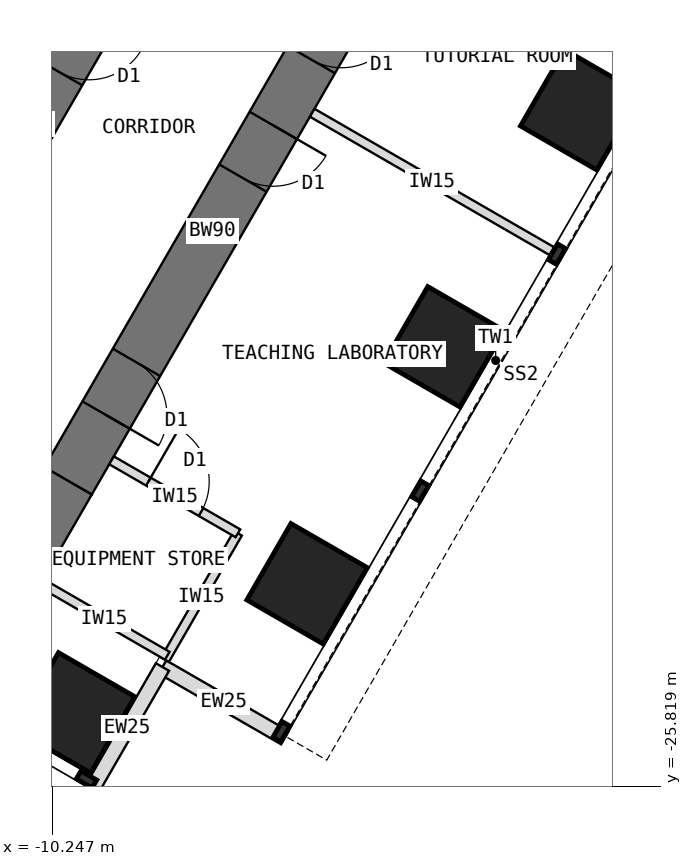
"""IFC4 building model, lengths in metres.
Left out: names, types, materials, properties, quantities, classifications, styles, units other than length and angle.
Written with IfcOpenShell. Run it as: python <this file> out.ifc"""

import sys

from ifc_helpers import new_model, si_unit, direction, frame, frame_2d, origin, origin_2d, place, context, subcontext, project, spatial, rectangle, extrude, element, fill, save


model = new_model("IFC4")
c1 = context("Model", 3, precision=1e-05, world=origin(), true_north=direction((0.0, 1.0)))
c2 = subcontext(c1, "Body", "Model", "MODEL_VIEW")
j1 = project(units=[si_unit("LENGTHUNIT", "METRE"), si_unit("PLANEANGLEUNIT", "RADIAN")], contexts=[c1])
p1 = place(None, origin())
s1 = spatial("IfcSite", under=j1, at=p1, CompositionType="ELEMENT")
p2 = place(p1, origin())
s2 = spatial("IfcBuilding", under=s1, at=p2, CompositionType="ELEMENT")
p3 = place(p2, frame((0.0, 0.0, 52.5)))
s3 = spatial("IfcBuildingStorey", under=s2, at=p3, CompositionType="ELEMENT", Elevation=52.5)
p4 = place(p3, frame((-5.234, -12.566, 0.0), z_axis=(0.0, 0.0, 1.0), x_axis=(-0.499997557548, -0.86602681393, 0.0)))
e1 = element("IfcWall", 1, at=p4, inside=s3, PredefinedType="SHEAR", context=c2, shape_type="SweptSolid", body=[
    extrude(rectangle(XDim=9.5, YDim=0.9, at=frame_2d((4.75, 0.0))), origin(), (0.0, 0.0, 1.0), 4.0),
])
p5 = place(p4, frame((0.5, 0.0, 0.0)))
e2 = element("IfcOpeningElement", 2, at=p5, cuts=e1, PredefinedType="OPENING", context=c2, shape_type="SweptSolid", body=[
    extrude(rectangle(XDim=1.0, YDim=2.1, at=frame_2d((0.5, 1.05))), frame((0.0, 0.46, 0.0), z_axis=(0.0, -1.0, 0.0), x_axis=(1.0, 0.0, 0.0)), (0.0, 0.0, 1.0), 0.92),
])
p6 = place(p4, frame((2.75, 0.0, 0.0)))
e3 = element("IfcOpeningElement", 3, at=p6, cuts=e1, PredefinedType="OPENING", context=c2, shape_type="SweptSolid", body=[
    extrude(rectangle(XDim=1.0, YDim=2.1, at=frame_2d((0.5, 1.05))), frame((0.0, 0.46, 0.0), z_axis=(0.0, -1.0, 0.0), x_axis=(1.0, 0.0, 0.0)), (0.0, 0.0, 1.0), 0.92),
])
p7 = place(p4, frame((7.25, 0.0, 0.0)))
e4 = element("IfcOpeningElement", 4, at=p7, cuts=e1, PredefinedType="OPENING", context=c2, shape_type="SweptSolid", body=[
    extrude(rectangle(XDim=1.0, YDim=2.1, at=frame_2d((0.5, 1.05))), frame((0.0, 0.46, 0.0), z_axis=(0.0, -1.0, 0.0), x_axis=(1.0, 0.0, 0.0)), (0.0, 0.0, 1.0), 0.92),
])
p8 = place(p3, frame((-9.984, -20.794, 0.0), z_axis=(0.0, 0.0, 1.0), x_axis=(-0.500042316284, -0.866000971088, 0.0)))
e5 = element("IfcWall", 5, at=p8, inside=s3, PredefinedType="SHEAR", context=c2, shape_type="SweptSolid", body=[
    extrude(rectangle(XDim=3.7, YDim=0.9, at=frame_2d((1.85, 0.0))), origin(), (0.0, 0.0, 1.0), 4.0),
])
p9 = place(p3, frame((-8.266, -10.816, 0.0), z_axis=(0.0, 0.0, 1.0), x_axis=(-0.499997557548, -0.86602681393, 0.0)))
e6 = element("IfcWall", 6, at=p9, inside=s3, PredefinedType="SHEAR", context=c2, shape_type="SweptSolid", body=[
    extrude(rectangle(XDim=9.5, YDim=0.9, at=frame_2d((4.75, 0.0))), origin(), (0.0, 0.0, 1.0), 4.0),
])
p10 = place(p9, frame((0.5, 0.0, 0.0)))
e7 = element("IfcOpeningElement", 7, at=p10, cuts=e6, PredefinedType="OPENING", context=c2, shape_type="SweptSolid", body=[
    extrude(rectangle(XDim=1.0, YDim=2.1, at=frame_2d((0.5, 1.05))), frame((0.0, 0.46, 0.0), z_axis=(0.0, -1.0, 0.0), x_axis=(1.0, 0.0, 0.0)), (0.0, 0.0, 1.0), 0.92),
])
p11 = place(p9, frame((2.75, 0.0, 0.0)))
e8 = element("IfcOpeningElement", 8, at=p11, cuts=e6, PredefinedType="OPENING", context=c2, shape_type="SweptSolid", body=[
    extrude(rectangle(XDim=1.0, YDim=2.1, at=frame_2d((0.5, 1.05))), frame((0.0, 0.46, 0.0), z_axis=(0.0, -1.0, 0.0), x_axis=(1.0, 0.0, 0.0)), (0.0, 0.0, 1.0), 0.92),
])
p12 = place(p9, frame((7.25, 0.0, 0.0)))
e9 = element("IfcOpeningElement", 9, at=p12, cuts=e6, PredefinedType="OPENING", context=c2, shape_type="SweptSolid", body=[
    extrude(rectangle(XDim=1.0, YDim=2.1, at=frame_2d((0.5, 1.05))), frame((0.0, 0.46, 0.0), z_axis=(0.0, -1.0, 0.0), x_axis=(1.0, 0.0, 0.0)), (0.0, 0.0, 1.0), 0.92),
])
for number, where, z_axis, x_axis in (
    (10, (-1.554, -14.691, 0.0), (0.0, 0.0, 1.0), (0.5, 0.866, 0.0)),
    (11, (-3.804, -18.588, 0.0), (0.0, 0.0, 1.0), (0.5, 0.866, 0.0)),
    (12, (-6.054, -22.486, 0.0), (0.0, 0.0, 1.0), (0.5, 0.866, 0.0)),
    (13, (-9.877, -24.608, 0.0), (0.0, 0.0, 1.0), (0.5, 0.866, 0.0)),
):
    element("IfcColumn", number, at=place(p3, frame(where, z_axis=z_axis, x_axis=x_axis)), inside=s3, PredefinedType="COLUMN", context=c2, shape_type="SweptSolid", body=[
        extrude(rectangle(XDim=1.45, YDim=1.45, at=origin_2d()), origin(), (0.0, 0.0, 1.0), 4.0),
    ])
for number, where, z_axis, x_axis in (
    (14, (-6.419, -25.017, 0.0), (0.0, 0.0, 1.0), (-0.866, 0.5, 0.0)),
    (15, (-8.432, -23.855, 0.0), (0.0, 0.0, 1.0), (-0.5, -0.866, 0.0)),
):
    element("IfcWall", number, at=place(p3, frame(where, z_axis=z_axis, x_axis=x_axis)), inside=s3, PredefinedType="STANDARD", context=c2, shape_type="SweptSolid", body=[
        extrude(rectangle(XDim=2.325, YDim=0.25, at=frame_2d((1.163, 0.0))), origin(), (0.0, 0.0, 1.0), 3.8),
    ])
p13 = place(p3, frame((-5.97, -14.74, 0.0), z_axis=(0.0, 0.0, 1.0), x_axis=(0.866035472144, -0.499982560684, 0.0)))
e16 = element("IfcWall", 16, at=p13, inside=s3, PredefinedType="PARTITIONING", context=c2, shape_type="SweptSolid", body=[
    extrude(rectangle(XDim=4.55, YDim=0.15, at=frame_2d((2.275, 0.0))), origin(), (0.0, 0.0, 1.0), 3.8),
])
p14 = place(p3, frame((-7.191, -21.656, 0.0), z_axis=(0.0, 0.0, 1.0), x_axis=(-0.500077600433, -0.865980596518, 0.0)))
e17 = element("IfcWall", 17, at=p14, inside=s3, PredefinedType="PARTITIONING", context=c2, shape_type="SweptSolid", body=[
    extrude(rectangle(XDim=2.4, YDim=0.15, at=frame_2d((1.2, 0.0))), origin(), (0.0, 0.0, 1.0), 3.8),
])
p15 = place(p3, frame((-9.27, -20.456, 0.0), z_axis=(0.0, 0.0, 1.0), x_axis=(0.866006032174, -0.500033551112, 0.0)))
e18 = element("IfcWall", 18, at=p15, inside=s3, PredefinedType="PARTITIONING", context=c2, shape_type="SweptSolid", body=[
    extrude(rectangle(XDim=2.4, YDim=0.15, at=frame_2d((1.2, 0.0))), origin(), (0.0, 0.0, 1.0), 3.8),
])
p16 = place(p15, frame((0.7, 0.0, 0.0)))
e19 = element("IfcOpeningElement", 19, at=p16, cuts=e18, PredefinedType="OPENING", context=c2, shape_type="SweptSolid", body=[
    extrude(rectangle(XDim=1.0, YDim=2.1, at=frame_2d((0.5, 1.05))), frame((0.0, 0.085, 0.0), z_axis=(0.0, -1.0, 0.0), x_axis=(1.0, 0.0, 0.0)), (0.0, 0.0, 1.0), 0.17),
])
p17 = place(p3, frame((-10.432, -22.469, 0.0), z_axis=(0.0, 0.0, 1.0), x_axis=(0.866024647952, -0.500001309137, 0.0)))
e20 = element("IfcWall", 20, at=p17, inside=s3, PredefinedType="PARTITIONING", context=c2, shape_type="SweptSolid", body=[
    extrude(rectangle(XDim=2.4, YDim=0.15, at=frame_2d((1.2, 0.0))), origin(), (0.0, 0.0, 1.0), 3.8),
])
p18 = place(p16, origin())
e21 = element("IfcDoor", 21, at=p18, inside=s3, OperationType="SINGLE_SWING_LEFT", PredefinedType="DOOR", context=c2, shape_type="SweptSolid", body=[
    extrude(rectangle(XDim=1.0, YDim=2.1, at=frame_2d((0.5, 1.05))), frame((0.0, 0.025, 0.0), z_axis=(0.0, -1.0, 0.0), x_axis=(1.0, 0.0, 0.0)), (0.0, 0.0, 1.0), 0.05),
])
fill(e19, e21)
p19 = place(p5, origin())
e22 = element("IfcDoor", 22, at=p19, inside=s3, OperationType="SINGLE_SWING_LEFT", PredefinedType="DOOR", context=c2, shape_type="SweptSolid", body=[
    extrude(rectangle(XDim=0.92, YDim=2.06, at=frame_2d((0.5, 1.03))), frame((0.0, 0.025, 0.0), z_axis=(0.0, -1.0, 0.0), x_axis=(1.0, 0.0, 0.0)), (0.0, 0.0, 1.0), 0.05),
    extrude(rectangle(XDim=0.04, YDim=2.1, at=frame_2d((0.02, 1.05))), frame((0.0, 0.45, 0.0), z_axis=(0.0, -1.0, 0.0), x_axis=(1.0, 0.0, 0.0)), (0.0, 0.0, 1.0), 0.899),
    extrude(rectangle(XDim=0.04, YDim=2.1, at=frame_2d((0.98, 1.05))), frame((0.0, 0.45, 0.0), z_axis=(0.0, -1.0, 0.0), x_axis=(1.0, 0.0, 0.0)), (0.0, 0.0, 1.0), 0.899),
    extrude(rectangle(XDim=0.92, YDim=0.04, at=frame_2d((0.5, 2.08))), frame((0.0, 0.45, 0.0), z_axis=(0.0, -1.0, 0.0), x_axis=(1.0, 0.0, 0.0)), (0.0, 0.0, 1.0), 0.899),
])
fill(e2, e22)
p20 = place(p6, origin())
e23 = element("IfcDoor", 23, at=p20, inside=s3, OperationType="SINGLE_SWING_LEFT", PredefinedType="DOOR", context=c2, shape_type="SweptSolid", body=[
    extrude(rectangle(XDim=0.92, YDim=2.06, at=frame_2d((0.5, 1.03))), frame((0.0, 0.025, 0.0), z_axis=(0.0, -1.0, 0.0), x_axis=(1.0, 0.0, 0.0)), (0.0, 0.0, 1.0), 0.05),
    extrude(rectangle(XDim=0.04, YDim=2.1, at=frame_2d((0.02, 1.05))), frame((0.0, 0.45, 0.0), z_axis=(0.0, -1.0, 0.0), x_axis=(1.0, 0.0, 0.0)), (0.0, 0.0, 1.0), 0.899),
    extrude(rectangle(XDim=0.04, YDim=2.1, at=frame_2d((0.98, 1.05))), frame((0.0, 0.45, 0.0), z_axis=(0.0, -1.0, 0.0), x_axis=(1.0, 0.0, 0.0)), (0.0, 0.0, 1.0), 0.899),
    extrude(rectangle(XDim=0.92, YDim=0.04, at=frame_2d((0.5, 2.08))), frame((0.0, 0.45, 0.0), z_axis=(0.0, -1.0, 0.0), x_axis=(1.0, 0.0, 0.0)), (0.0, 0.0, 1.0), 0.899),
])
fill(e3, e23)
p21 = place(p7, origin())
e24 = element("IfcDoor", 24, at=p21, inside=s3, OperationType="SINGLE_SWING_RIGHT", PredefinedType="DOOR", context=c2, shape_type="SweptSolid", body=[
    extrude(rectangle(XDim=0.92, YDim=2.06, at=frame_2d((0.5, 1.03))), frame((0.0, 0.025, 0.0), z_axis=(0.0, -1.0, 0.0), x_axis=(1.0, 0.0, 0.0)), (0.0, 0.0, 1.0), 0.05),
    extrude(rectangle(XDim=0.04, YDim=2.1, at=frame_2d((0.02, 1.05))), frame((0.0, 0.45, 0.0), z_axis=(0.0, -1.0, 0.0), x_axis=(1.0, 0.0, 0.0)), (0.0, 0.0, 1.0), 0.899),
    extrude(rectangle(XDim=0.04, YDim=2.1, at=frame_2d((0.98, 1.05))), frame((0.0, 0.45, 0.0), z_axis=(0.0, -1.0, 0.0), x_axis=(1.0, 0.0, 0.0)), (0.0, 0.0, 1.0), 0.899),
    extrude(rectangle(XDim=0.92, YDim=0.04, at=frame_2d((0.5, 2.08))), frame((0.0, 0.45, 0.0), z_axis=(0.0, -1.0, 0.0), x_axis=(1.0, 0.0, 0.0)), (0.0, 0.0, 1.0), 0.899),
])
fill(e4, e24)
p22 = place(p11, origin())
e25 = element("IfcDoor", 25, at=p22, inside=s3, OperationType="SINGLE_SWING_LEFT", PredefinedType="DOOR", context=c2, shape_type="SweptSolid", body=[
    extrude(rectangle(XDim=0.92, YDim=2.06, at=frame_2d((0.5, 1.03))), frame((0.0, 0.025, 0.0), z_axis=(0.0, -1.0, 0.0), x_axis=(1.0, 0.0, 0.0)), (0.0, 0.0, 1.0), 0.05),
    extrude(rectangle(XDim=0.04, YDim=2.1, at=frame_2d((0.02, 1.05))), frame((0.0, 0.45, 0.0), z_axis=(0.0, -1.0, 0.0), x_axis=(1.0, 0.0, 0.0)), (0.0, 0.0, 1.0), 0.899),
    extrude(rectangle(XDim=0.04, YDim=2.1, at=frame_2d((0.98, 1.05))), frame((0.0, 0.45, 0.0), z_axis=(0.0, -1.0, 0.0), x_axis=(1.0, 0.0, 0.0)), (0.0, 0.0, 1.0), 0.899),
    extrude(rectangle(XDim=0.92, YDim=0.04, at=frame_2d((0.5, 2.08))), frame((0.0, 0.45, 0.0), z_axis=(0.0, -1.0, 0.0), x_axis=(1.0, 0.0, 0.0)), (0.0, 0.0, 1.0), 0.899),
])
fill(e8, e25)
save(model, sys.argv[1])
